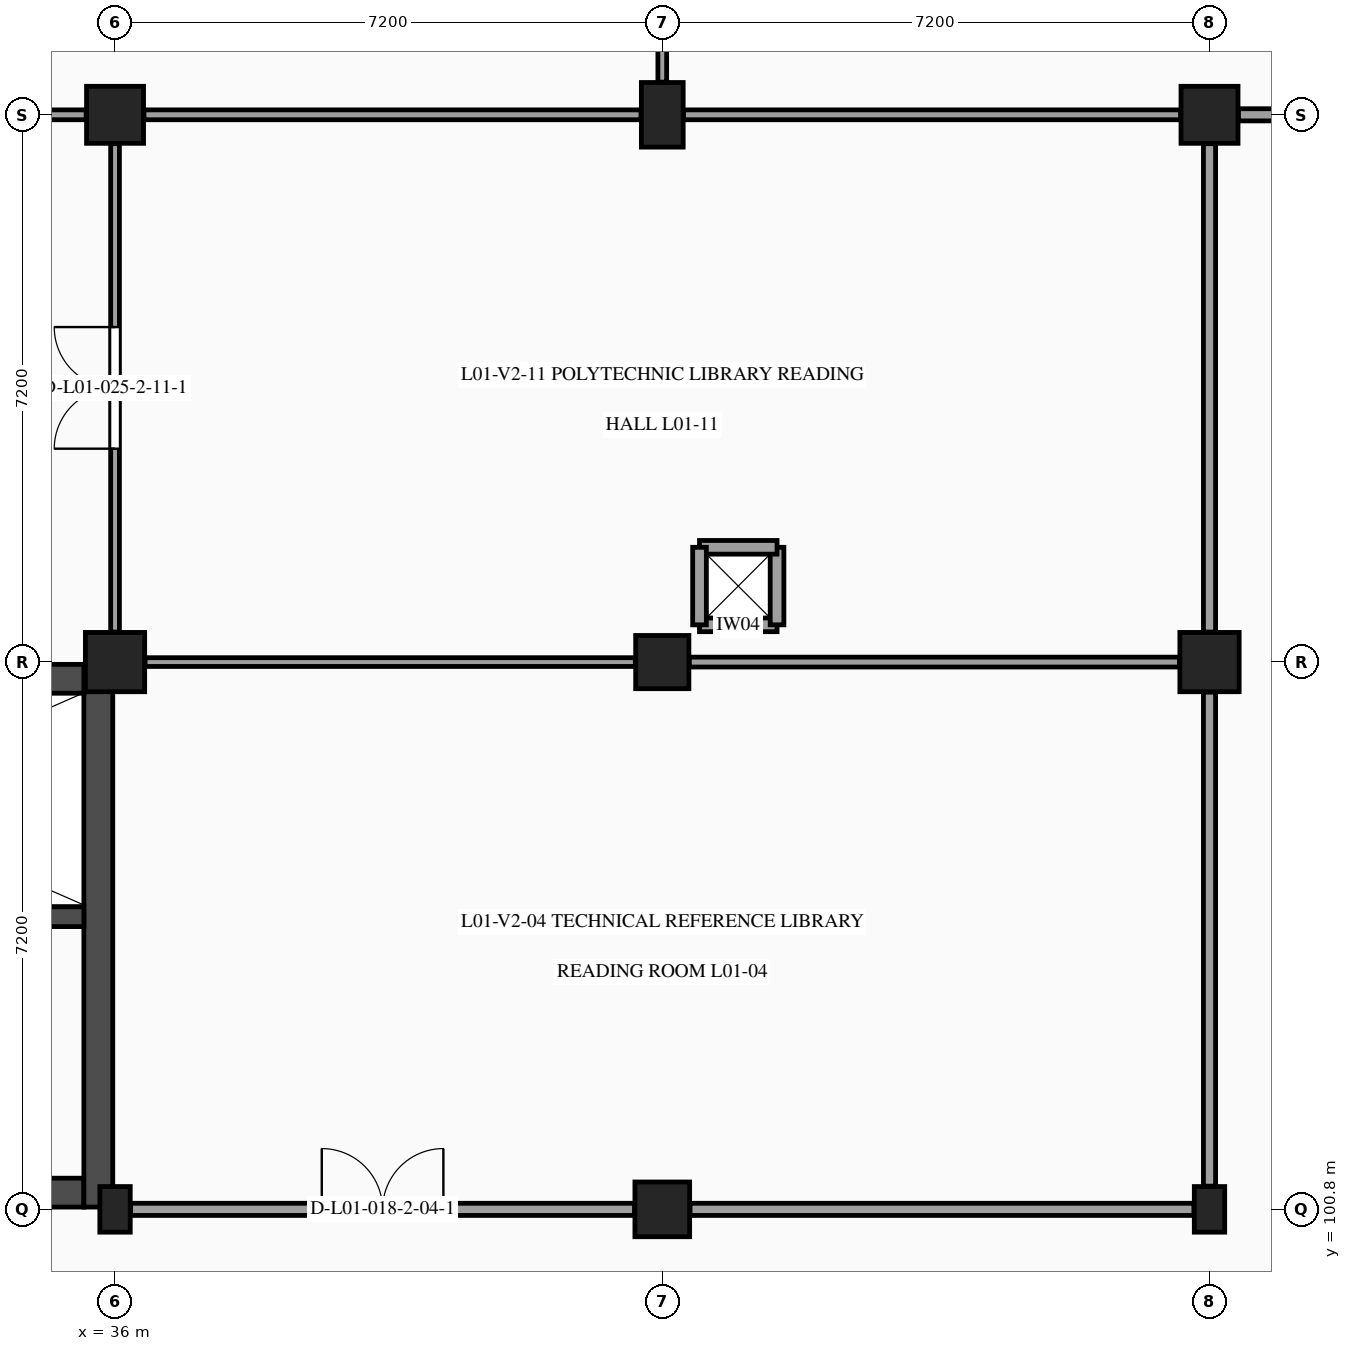
"""IFC4 building model, lengths in metres.
Left out: names, types, materials, properties, quantities, classifications, styles, units other than length and angle.
Written with IfcOpenShell. Run it as: python <this file> out.ifc"""

import sys

from ifc_helpers import new_model, si_unit, direction, frame, frame_2d, origin, origin_2d, place, context, subcontext, project, spatial, rectangle, extrude, element, fill, save


model = new_model("IFC4")
c1 = context("Model", 3, precision=1e-05, world=origin(), true_north=direction((0.0, 1.0)))
c2 = subcontext(c1, "Body", "Model", "MODEL_VIEW")
j1 = project(units=[si_unit("LENGTHUNIT", "METRE"), si_unit("PLANEANGLEUNIT", "RADIAN")], contexts=[c1])
p1 = place(None, origin())
s1 = spatial("IfcSite", under=j1, at=p1, CompositionType="ELEMENT")
p2 = place(p1, origin())
s2 = spatial("IfcBuilding", under=s1, at=p2, CompositionType="ELEMENT")
p3 = place(p2, frame((0.0, 0.0, 5.4)))
s3 = spatial("IfcBuildingStorey", under=s2, at=p3, CompositionType="ELEMENT", Elevation=5.4)
p4 = place(p3, frame((36.0, 100.8, 0.0), z_axis=(0.0, 0.0, 1.0), x_axis=(1.0, 0.0, 0.0)))
e1 = element("IfcColumn", 1, at=p4, inside=s3, PredefinedType="PILASTER", context=c2, shape_type="SweptSolid", body=[
    extrude(rectangle(XDim=0.4, YDim=0.6, at=origin_2d()), origin(), (0.0, 0.0, 1.0), 4.5),
])
p5 = place(p3, frame((36.0, 108.0, 0.0), z_axis=(0.0, 0.0, 1.0), x_axis=(1.0, 0.0, 0.0)))
e2 = element("IfcColumn", 2, at=p5, inside=s3, PredefinedType="COLUMN", context=c2, shape_type="SweptSolid", body=[
    extrude(rectangle(XDim=0.78, YDim=0.78, at=origin_2d()), origin(), (0.0, 0.0, 1.0), 4.5),
])
p6 = place(p3, frame((36.0, 115.2, 0.0), z_axis=(0.0, 0.0, 1.0), x_axis=(1.0, 0.0, 0.0)))
e3 = element("IfcColumn", 3, at=p6, inside=s3, PredefinedType="COLUMN", context=c2, shape_type="SweptSolid", body=[
    extrude(rectangle(XDim=0.75, YDim=0.75, at=origin_2d()), origin(), (0.0, 0.0, 1.0), 4.5),
])
p7 = place(p3, frame((43.2, 100.8, 0.0), z_axis=(0.0, 0.0, 1.0), x_axis=(1.0, 0.0, 0.0)))
e4 = element("IfcColumn", 4, at=p7, inside=s3, PredefinedType="COLUMN", context=c2, shape_type="SweptSolid", body=[
    extrude(rectangle(XDim=0.72, YDim=0.72, at=origin_2d()), origin(), (0.0, 0.0, 1.0), 4.5),
])
p8 = place(p3, frame((43.2, 108.0, 0.0), z_axis=(0.0, 0.0, 1.0), x_axis=(1.0, 0.0, 0.0)))
e5 = element("IfcColumn", 5, at=p8, inside=s3, PredefinedType="COLUMN", context=c2, shape_type="SweptSolid", body=[
    extrude(rectangle(XDim=0.7, YDim=0.7, at=origin_2d()), origin(), (0.0, 0.0, 1.0), 4.5),
])
p9 = place(p3, frame((43.2, 115.2, 0.0), z_axis=(0.0, 0.0, 1.0), x_axis=(1.0, 0.0, 0.0)))
e6 = element("IfcColumn", 6, at=p9, inside=s3, PredefinedType="COLUMN", context=c2, shape_type="SweptSolid", body=[
    extrude(rectangle(XDim=0.55, YDim=0.85, at=origin_2d()), origin(), (0.0, 0.0, 1.0), 4.5),
])
p10 = place(p3, frame((50.4, 100.8, 0.0), z_axis=(0.0, 0.0, 1.0), x_axis=(1.0, 0.0, 0.0)))
e7 = element("IfcColumn", 7, at=p10, inside=s3, PredefinedType="PILASTER", context=c2, shape_type="SweptSolid", body=[
    extrude(rectangle(XDim=0.4, YDim=0.6, at=origin_2d()), origin(), (0.0, 0.0, 1.0), 4.5),
])
p11 = place(p3, frame((50.4, 108.0, 0.0), z_axis=(0.0, 0.0, 1.0), x_axis=(1.0, 0.0, 0.0)))
e8 = element("IfcColumn", 8, at=p11, inside=s3, PredefinedType="COLUMN", context=c2, shape_type="SweptSolid", body=[
    extrude(rectangle(XDim=0.78, YDim=0.78, at=origin_2d()), origin(), (0.0, 0.0, 1.0), 4.5),
])
p12 = place(p3, frame((50.4, 115.2, 0.0), z_axis=(0.0, 0.0, 1.0), x_axis=(1.0, 0.0, 0.0)))
e9 = element("IfcColumn", 9, at=p12, inside=s3, PredefinedType="COLUMN", context=c2, shape_type="SweptSolid", body=[
    extrude(rectangle(XDim=0.75, YDim=0.75, at=origin_2d()), origin(), (0.0, 0.0, 1.0), 4.5),
])
p13 = place(p3, frame((28.99, 101.02, 0.0), z_axis=(0.0, 0.0, 1.0), x_axis=(1.0, 0.0, 0.0)))
e10 = element("IfcWall", 10, at=p13, inside=s3, PredefinedType="SHEAR", context=c2, shape_type="SweptSolid", body=[
    extrude(rectangle(XDim=6.6, YDim=0.38, at=frame_2d((3.3, 0.0))), origin(), (0.0, 0.0, 1.0), 4.21),
])
p14 = place(p13, frame((2.22, 0.0, 0.0)))
e11 = element("IfcOpeningElement", 11, at=p14, cuts=e10, PredefinedType="OPENING", context=c2, shape_type="SweptSolid", body=[
    extrude(rectangle(XDim=1.8, YDim=2.2, at=frame_2d((0.9, 1.1))), frame((0.0, 0.2, 0.0), z_axis=(0.0, -1.0, 0.0), x_axis=(1.0, 0.0, 0.0)), (0.0, 0.0, 1.0), 0.4),
])
p15 = place(p3, frame((35.78, 100.83, 0.0), z_axis=(0.0, 0.0, 1.0), x_axis=(0.0, 1.0, 0.0)))
e12 = element("IfcWall", 12, at=p15, inside=s3, PredefinedType="SHEAR", context=c2, shape_type="SweptSolid", body=[
    extrude(rectangle(XDim=7.14, YDim=0.38, at=frame_2d((3.57, 0.0))), origin(), (0.0, 0.0, 1.0), 4.21),
])
p16 = place(p3, frame((28.99, 107.78, 0.0), z_axis=(0.0, 0.0, 1.0), x_axis=(1.0, 0.0, 0.0)))
e13 = element("IfcWall", 13, at=p16, inside=s3, PredefinedType="SHEAR", context=c2, shape_type="SweptSolid", body=[
    extrude(rectangle(XDim=6.6, YDim=0.38, at=frame_2d((3.3, 0.0))), origin(), (0.0, 0.0, 1.0), 4.21),
])
p17 = place(p3, frame((28.99, 104.65, 0.0), z_axis=(0.0, 0.0, 1.0), x_axis=(1.0, 0.0, 0.0)))
e14 = element("IfcWall", 14, at=p17, inside=s3, PredefinedType="SHEAR", context=c2, shape_type="SweptSolid", body=[
    extrude(rectangle(XDim=6.6, YDim=0.26, at=frame_2d((3.3, 0.0))), origin(), (0.0, 0.0, 1.0), 4.21),
])
p18 = place(p17, frame((0.95, 0.0, 0.0)))
e15 = element("IfcOpeningElement", 15, at=p18, cuts=e14, PredefinedType="OPENING", context=c2, shape_type="SweptSolid", body=[
    extrude(rectangle(XDim=1.1, YDim=2.2, at=frame_2d((0.55, 1.1))), frame((0.0, 0.14, 0.0), z_axis=(0.0, -1.0, 0.0), x_axis=(1.0, 0.0, 0.0)), (0.0, 0.0, 1.0), 0.28),
])
p19 = place(p17, frame((4.1, 0.0, 0.0)))
e16 = element("IfcOpeningElement", 16, at=p19, cuts=e14, PredefinedType="OPENING", context=c2, shape_type="SweptSolid", body=[
    extrude(rectangle(XDim=1.0, YDim=2.15, at=frame_2d((0.5, 1.075))), frame((0.0, 0.14, 0.0), z_axis=(0.0, -1.0, 0.0), x_axis=(1.0, 0.0, 0.0)), (0.0, 0.0, 1.0), 0.28),
])
for number, where, z_axis, x_axis in (
    (17, (43.69, 108.49, 0.0), (0.0, 0.0, 1.0), (1.0, 0.0, 0.0)),
    (18, (44.71, 108.49, 0.0), (0.0, 0.0, 1.0), (0.0, 1.0, 0.0)),
    (19, (44.71, 109.51, 0.0), (0.0, 0.0, 1.0), (-1.0, 0.0, 0.0)),
    (20, (43.69, 109.51, 0.0), (0.0, 0.0, 1.0), (0.0, -1.0, 0.0)),
):
    element("IfcWall", number, at=place(p3, frame(where, z_axis=z_axis, x_axis=x_axis)), inside=s3, PredefinedType="PARTITIONING", context=c2, shape_type="SweptSolid", body=[
        extrude(rectangle(XDim=1.02, YDim=0.18, at=frame_2d((0.51, 0.0))), origin(), (0.0, 0.0, 1.0), 4.21),
    ])
p20 = place(p3, frame((36.0, 108.395, 0.0), z_axis=(0.0, 0.0, 1.0), x_axis=(0.0, 1.0, 0.0)))
e21 = element("IfcWall", 21, at=p20, inside=s3, PredefinedType="PARTITIONING", context=c2, shape_type="SweptSolid", body=[
    extrude(rectangle(XDim=6.425, YDim=0.115, at=frame_2d((3.212, 0.0))), origin(), (0.0, 0.0, 1.0), 3.525),
])
p21 = place(p20, frame((2.413, 0.0, 0.0)))
e22 = element("IfcOpeningElement", 22, at=p21, cuts=e21, PredefinedType="OPENING", context=c2, shape_type="SweptSolid", body=[
    extrude(rectangle(XDim=1.6, YDim=2.2, at=frame_2d((0.8, 1.1))), frame((0.0, 0.067, 0.0), z_axis=(0.0, -1.0, 0.0), x_axis=(1.0, 0.0, 0.0)), (0.0, 0.0, 1.0), 0.135),
])
p22 = place(p3, frame((29.08, 115.2, 0.0), z_axis=(0.0, 0.0, 1.0), x_axis=(1.0, 0.0, 0.0)))
e23 = element("IfcWall", 23, at=p22, inside=s3, PredefinedType="PARTITIONING", context=c2, shape_type="SweptSolid", body=[
    extrude(rectangle(XDim=6.54, YDim=0.13, at=frame_2d((3.27, 0.0))), origin(), (0.0, 0.0, 1.0), 3.51),
])
p23 = place(p3, frame((36.205, 100.8, 0.0), z_axis=(0.0, 0.0, 1.0), x_axis=(1.0, 0.0, 0.0)))
e24 = element("IfcWall", 24, at=p23, inside=s3, PredefinedType="PARTITIONING", context=c2, shape_type="SweptSolid", body=[
    extrude(rectangle(XDim=6.63, YDim=0.16, at=frame_2d((3.315, 0.0))), origin(), (0.0, 0.0, 1.0), 3.55),
])
p24 = place(p23, frame((2.515, 0.0, 0.0)))
e25 = element("IfcOpeningElement", 25, at=p24, cuts=e24, PredefinedType="OPENING", context=c2, shape_type="SweptSolid", body=[
    extrude(rectangle(XDim=1.6, YDim=2.2, at=frame_2d((0.8, 1.1))), frame((0.0, 0.09, 0.0), z_axis=(0.0, -1.0, 0.0), x_axis=(1.0, 0.0, 0.0)), (0.0, 0.0, 1.0), 0.18),
])
p25 = place(p3, frame((36.395, 108.0, 0.0), z_axis=(0.0, 0.0, 1.0), x_axis=(1.0, 0.0, 0.0)))
e26 = element("IfcWall", 26, at=p25, inside=s3, PredefinedType="PARTITIONING", context=c2, shape_type="SweptSolid", body=[
    extrude(rectangle(XDim=6.45, YDim=0.115, at=frame_2d((3.225, 0.0))), origin(), (0.0, 0.0, 1.0), 3.55),
])
p26 = place(p3, frame((36.38, 115.2, 0.0), z_axis=(0.0, 0.0, 1.0), x_axis=(1.0, 0.0, 0.0)))
e27 = element("IfcWall", 27, at=p26, inside=s3, PredefinedType="PARTITIONING", context=c2, shape_type="SweptSolid", body=[
    extrude(rectangle(XDim=6.54, YDim=0.13, at=frame_2d((3.27, 0.0))), origin(), (0.0, 0.0, 1.0), 3.55),
])
p27 = place(p3, frame((43.2, 115.63, 0.0), z_axis=(0.0, 0.0, 1.0), x_axis=(0.0, 1.0, 0.0)))
e28 = element("IfcWall", 28, at=p27, inside=s3, PredefinedType="PARTITIONING", context=c2, shape_type="SweptSolid", body=[
    extrude(rectangle(XDim=6.465, YDim=0.115, at=frame_2d((3.232, 0.0))), origin(), (0.0, 0.0, 1.0), 3.52),
])
p28 = place(p27, frame((2.683, 0.0, 0.0)))
e29 = element("IfcOpeningElement", 29, at=p28, cuts=e28, PredefinedType="OPENING", context=c2, shape_type="SweptSolid", body=[
    extrude(rectangle(XDim=1.1, YDim=2.15, at=frame_2d((0.55, 1.075))), frame((0.0, 0.067, 0.0), z_axis=(0.0, -1.0, 0.0), x_axis=(1.0, 0.0, 0.0)), (0.0, 0.0, 1.0), 0.135),
])
p29 = place(p3, frame((43.565, 100.8, 0.0), z_axis=(0.0, 0.0, 1.0), x_axis=(1.0, 0.0, 0.0)))
e30 = element("IfcWall", 30, at=p29, inside=s3, PredefinedType="PARTITIONING", context=c2, shape_type="SweptSolid", body=[
    extrude(rectangle(XDim=6.63, YDim=0.16, at=frame_2d((3.315, 0.0))), origin(), (0.0, 0.0, 1.0), 3.56),
])
p30 = place(p3, frame((50.4, 101.105, 0.0), z_axis=(0.0, 0.0, 1.0), x_axis=(0.0, 1.0, 0.0)))
e31 = element("IfcWall", 31, at=p30, inside=s3, PredefinedType="PARTITIONING", context=c2, shape_type="SweptSolid", body=[
    extrude(rectangle(XDim=6.5, YDim=0.16, at=frame_2d((3.25, 0.0))), origin(), (0.0, 0.0, 1.0), 3.525),
])
p31 = place(p3, frame((43.555, 108.0, 0.0), z_axis=(0.0, 0.0, 1.0), x_axis=(1.0, 0.0, 0.0)))
e32 = element("IfcWall", 32, at=p31, inside=s3, PredefinedType="PARTITIONING", context=c2, shape_type="SweptSolid", body=[
    extrude(rectangle(XDim=6.45, YDim=0.13, at=frame_2d((3.225, 0.0))), origin(), (0.0, 0.0, 1.0), 3.56),
])
p32 = place(p3, frame((50.4, 108.395, 0.0), z_axis=(0.0, 0.0, 1.0), x_axis=(0.0, 1.0, 0.0)))
e33 = element("IfcWall", 33, at=p32, inside=s3, PredefinedType="PARTITIONING", context=c2, shape_type="SweptSolid", body=[
    extrude(rectangle(XDim=6.425, YDim=0.16, at=frame_2d((3.212, 0.0))), origin(), (0.0, 0.0, 1.0), 3.525),
])
p33 = place(p3, frame((43.48, 115.2, 0.0), z_axis=(0.0, 0.0, 1.0), x_axis=(1.0, 0.0, 0.0)))
e34 = element("IfcWall", 34, at=p33, inside=s3, PredefinedType="PARTITIONING", context=c2, shape_type="SweptSolid", body=[
    extrude(rectangle(XDim=6.54, YDim=0.13, at=frame_2d((3.27, 0.0))), origin(), (0.0, 0.0, 1.0), 3.56),
])
p34 = place(p3, frame((50.78, 115.2, 0.0), z_axis=(0.0, 0.0, 1.0), x_axis=(1.0, 0.0, 0.0)))
e35 = element("IfcWall", 35, at=p34, inside=s3, PredefinedType="PARTITIONING", context=c2, shape_type="SweptSolid", body=[
    extrude(rectangle(XDim=6.54, YDim=0.16, at=frame_2d((3.27, 0.0))), origin(), (0.0, 0.0, 1.0), 3.57),
])
p35 = place(p24, origin())
e36 = element("IfcDoor", 36, at=p35, inside=s3, OperationType="DOUBLE_DOOR_SINGLE_SWING", PredefinedType="DOOR", context=c2, shape_type="SweptSolid", body=[
    extrude(rectangle(XDim=1.6, YDim=2.2, at=frame_2d((0.8, 1.1))), frame((0.0, 0.025, 0.0), z_axis=(0.0, -1.0, 0.0), x_axis=(1.0, 0.0, 0.0)), (0.0, 0.0, 1.0), 0.05),
])
fill(e25, e36)
p36 = place(p21, origin())
e37 = element("IfcDoor", 37, at=p36, inside=s3, OperationType="DOUBLE_DOOR_SINGLE_SWING", PredefinedType="DOOR", context=c2, shape_type="SweptSolid", body=[
    extrude(rectangle(XDim=1.6, YDim=2.2, at=frame_2d((0.8, 1.1))), frame((0.0, 0.025, 0.0), z_axis=(0.0, -1.0, 0.0), x_axis=(1.0, 0.0, 0.0)), (0.0, 0.0, 1.0), 0.05),
])
fill(e22, e37)
save(model, sys.argv[1])
